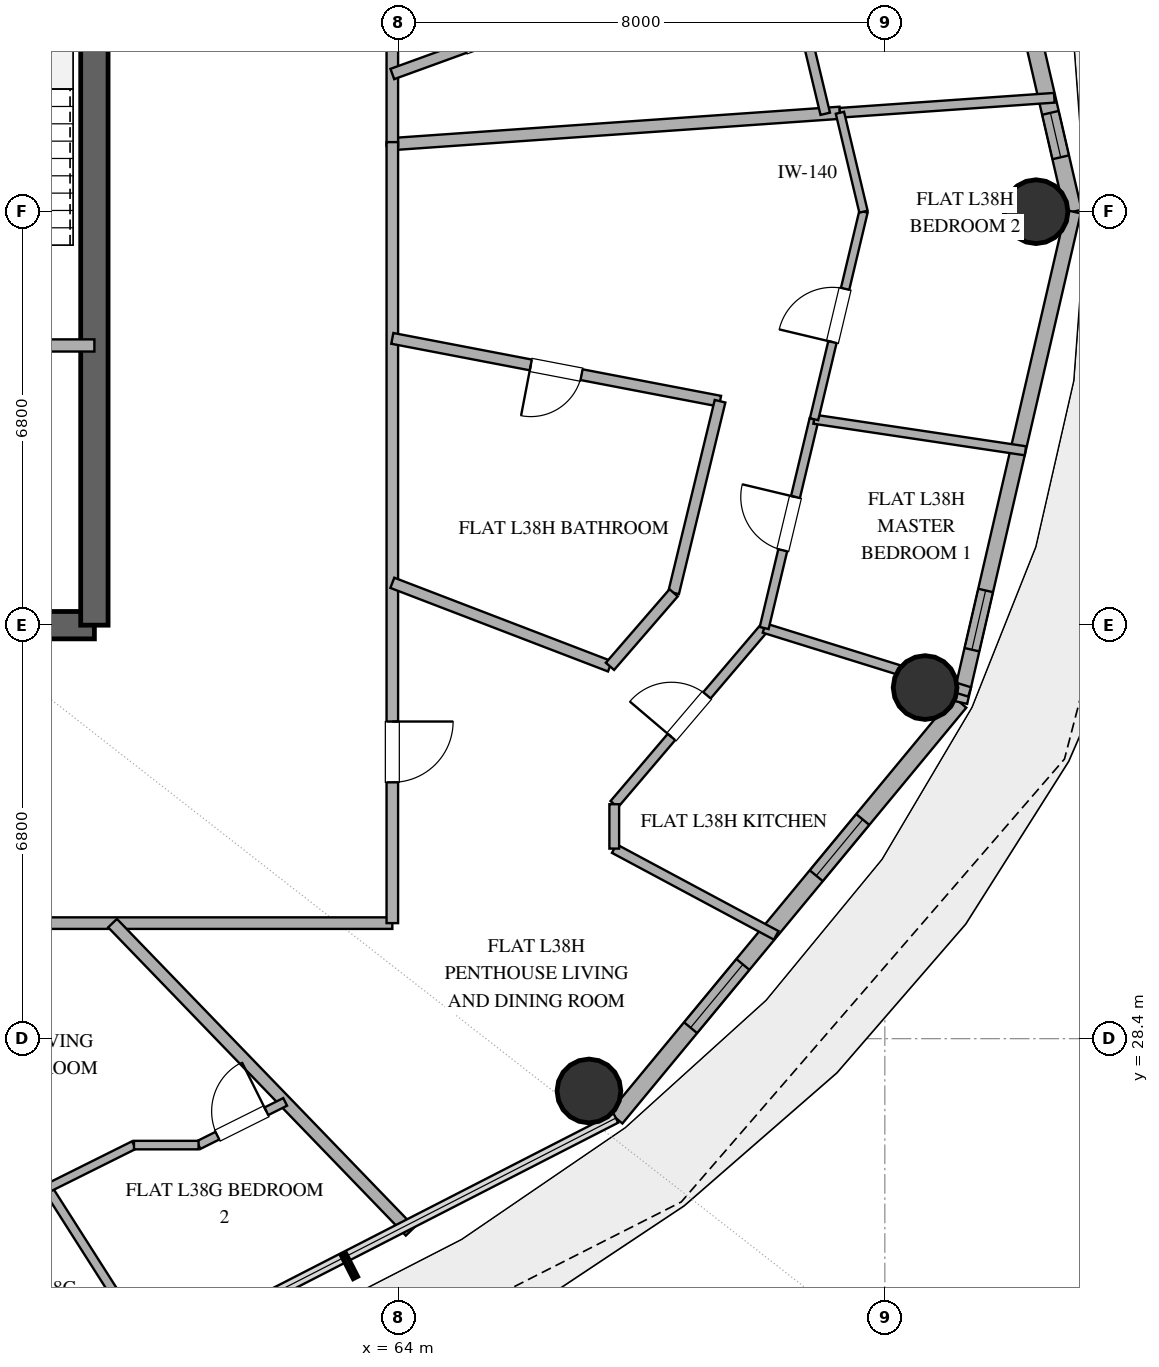
"""IFC4 building model, lengths in metres.
Left out: names, types, materials, properties, quantities, classifications, styles, units other than length and angle.
Written with IfcOpenShell. Run it as: python <this file> out.ifc"""

import sys

from ifc_helpers import new_model, si_unit, direction, frame, frame_2d, origin, origin_2d, place, context, subcontext, project, spatial, rectangle, hollow_circle, extrude, element, fill, save


model = new_model("IFC4")
c1 = context("Model", 3, precision=1e-05, world=origin(), true_north=direction((0.0, 1.0)))
c2 = subcontext(c1, "Body", "Model", "MODEL_VIEW")
j1 = project(units=[si_unit("LENGTHUNIT", "METRE"), si_unit("PLANEANGLEUNIT", "RADIAN")], contexts=[c1])
p1 = place(None, origin())
s1 = spatial("IfcSite", under=j1, at=p1, CompositionType="ELEMENT")
p2 = place(p1, origin())
s2 = spatial("IfcBuilding", under=s1, at=p2, CompositionType="ELEMENT")
p3 = place(p2, frame((0.0, 0.0, 154.2)))
s3 = spatial("IfcBuildingStorey", under=s2, at=p3, CompositionType="ELEMENT", Elevation=154.2)
p4 = place(p3, frame((55.0, 35.2, 0.0), z_axis=(0.0, 0.0, 1.0), x_axis=(1.0, 0.0, 0.0)))
e1 = element("IfcWall", 1, at=p4, inside=s3, PredefinedType="SHEAR", context=c2, shape_type="SweptSolid", body=[
    extrude(rectangle(XDim=4.0, YDim=0.45, at=frame_2d((2.0, 0.0))), origin(), (0.0, 0.0, 1.0), 3.38),
])
p5 = place(p4, frame((1.4, 0.0, 0.0)))
e2 = element("IfcOpeningElement", 2, at=p5, cuts=e1, PredefinedType="OPENING", context=c2, shape_type="SweptSolid", body=[
    extrude(rectangle(XDim=1.2, YDim=2.15, at=frame_2d((0.6, 1.075))), frame((0.0, 0.235, 0.0), z_axis=(0.0, -1.0, 0.0), x_axis=(1.0, 0.0, 0.0)), (0.0, 0.0, 1.0), 0.47),
])
p6 = place(p3, frame((59.0, 35.2, 0.0), z_axis=(0.0, 0.0, 1.0), x_axis=(0.0, 1.0, 0.0)))
e3 = element("IfcWall", 3, at=p6, inside=s3, PredefinedType="SHEAR", context=c2, shape_type="SweptSolid", body=[
    extrude(rectangle(XDim=13.6, YDim=0.45, at=frame_2d((6.8, 0.0))), origin(), (0.0, 0.0, 1.0), 3.38),
])
for number, where, z_axis, x_axis in (
    (4, (74.487, 42.0, 0.0), (0.0, 0.0, 1.0), (1.0, 0.0, 0.0)),
    (5, (67.134, 27.54, 0.0), (0.0, 0.0, 1.0), (1.0, 0.0, 0.0)),
    (6, (72.662, 34.174, 0.0), (0.0, 0.0, 1.0), (1.0, 0.0, 0.0)),
):
    element("IfcColumn", number, at=place(p3, frame(where, z_axis=z_axis, x_axis=x_axis)), inside=s3, PredefinedType="COLUMN", context=c2, shape_type="SweptSolid", body=[
        extrude(hollow_circle(Radius=0.525, WallThickness=0.028, at=origin_2d()), origin(), (0.0, 0.0, 1.0), 3.38),
    ])
p7 = place(p3, frame((75.099, 42.0, 0.0), z_axis=(0.0, 0.0, 1.0), x_axis=(-0.225473184558, 0.974249374157, 0.0)))
e7 = element("IfcWall", 7, at=p7, inside=s3, PredefinedType="SOLIDWALL", context=c2, shape_type="SweptSolid", body=[
    extrude(rectangle(XDim=8.28, YDim=0.28, at=frame_2d((4.14, 0.0))), origin(), (0.0, 0.0, 1.0), 3.38),
])
p8 = place(p7, frame((5.644, 0.0, 0.0)))
e8 = element("IfcOpeningElement", 8, at=p8, cuts=e7, PredefinedType="OPENING", context=c2, shape_type="SweptSolid", body=[
    extrude(rectangle(XDim=1.1, YDim=2.25, at=frame_2d((0.55, 1.125))), frame((0.0, 0.15, 0.0), z_axis=(0.0, -1.0, 0.0), x_axis=(1.0, 0.0, 0.0)), (0.0, 0.0, 1.0), 0.3),
])
p9 = place(p7, frame((0.918, 0.0, 0.85)))
e9 = element("IfcOpeningElement", 9, at=p9, cuts=e7, PredefinedType="OPENING", context=c2, shape_type="SweptSolid", body=[
    extrude(rectangle(XDim=0.75, YDim=1.8, at=frame_2d((0.375, 0.9))), frame((0.0, 0.15, 0.0), z_axis=(0.0, -1.0, 0.0), x_axis=(1.0, 0.0, 0.0)), (0.0, 0.0, 1.0), 0.3),
])
p10 = place(p3, frame((67.576, 27.094, 0.0), z_axis=(0.0, 0.0, 1.0), x_axis=(0.637333477683, 0.770588111915, 0.0)))
e10 = element("IfcWall", 10, at=p10, inside=s3, PredefinedType="SOLIDWALL", context=c2, shape_type="SweptSolid", body=[
    extrude(rectangle(XDim=8.875, YDim=0.28, at=frame_2d((4.438, 0.0))), origin(), (0.0, 0.0, 1.0), 3.38),
])
p11 = place(p10, frame((1.929, 0.0, 0.85)))
e11 = element("IfcOpeningElement", 11, at=p11, cuts=e10, PredefinedType="OPENING", context=c2, shape_type="SweptSolid", body=[
    extrude(rectangle(XDim=1.35, YDim=1.8, at=frame_2d((0.675, 0.9))), frame((0.0, 0.15, 0.0), z_axis=(0.0, -1.0, 0.0), x_axis=(1.0, 0.0, 0.0)), (0.0, 0.0, 1.0), 0.3),
])
p12 = place(p10, frame((5.172, 0.0, 0.85)))
e12 = element("IfcOpeningElement", 12, at=p12, cuts=e10, PredefinedType="OPENING", context=c2, shape_type="SweptSolid", body=[
    extrude(rectangle(XDim=1.2, YDim=1.8, at=frame_2d((0.6, 0.9))), frame((0.0, 0.15, 0.0), z_axis=(0.0, -1.0, 0.0), x_axis=(1.0, 0.0, 0.0)), (0.0, 0.0, 1.0), 0.3),
])
p13 = place(p3, frame((73.232, 33.933, 0.0), z_axis=(0.0, 0.0, 1.0), x_axis=(0.225473184558, 0.974249374157, 0.0)))
e13 = element("IfcWall", 13, at=p13, inside=s3, PredefinedType="SOLIDWALL", context=c2, shape_type="SweptSolid", body=[
    extrude(rectangle(XDim=8.28, YDim=0.25, at=frame_2d((4.14, 0.0))), origin(), (0.0, 0.0, 1.0), 3.38),
])
p14 = place(p13, frame((0.886, 0.0, 1.42)))
e14 = element("IfcOpeningElement", 14, at=p14, cuts=e13, PredefinedType="OPENING", context=c2, shape_type="SweptSolid", body=[
    extrude(rectangle(XDim=1.0, YDim=1.05, at=frame_2d((0.5, 0.525))), frame((0.0, 0.135, 0.0), z_axis=(0.0, -1.0, 0.0), x_axis=(1.0, 0.0, 0.0)), (0.0, 0.0, 1.0), 0.27),
])
p15 = place(p3, frame((55.0, 39.8, 0.0), z_axis=(0.0, 0.0, 1.0), x_axis=(1.0, 0.0, 0.0)))
e15 = element("IfcWall", 15, at=p15, inside=s3, PredefinedType="SOLIDWALL", context=c2, shape_type="SweptSolid", body=[
    extrude(rectangle(XDim=4.0, YDim=0.2, at=frame_2d((2.0, 0.0))), origin(), (0.0, 0.0, 1.0), 2.74),
])
p16 = place(p15, frame((1.45, 0.0, 0.0)))
e16 = element("IfcOpeningElement", 16, at=p16, cuts=e15, PredefinedType="OPENING", context=c2, shape_type="SweptSolid", body=[
    extrude(rectangle(XDim=1.1, YDim=2.15, at=frame_2d((0.55, 1.075))), frame((0.0, 0.11, 0.0), z_axis=(0.0, -1.0, 0.0), x_axis=(1.0, 0.0, 0.0)), (0.0, 0.0, 1.0), 0.22),
])
p17 = place(p3, frame((48.891, 30.3, 0.0), z_axis=(0.0, 0.0, 1.0), x_axis=(1.0, 0.0, 0.0)))
e17 = element("IfcWall", 17, at=p17, inside=s3, PredefinedType="PARTITIONING", context=c2, shape_type="SweptSolid", body=[
    extrude(rectangle(XDim=15.009, YDim=0.19, at=frame_2d((7.504, 0.0))), origin(), (0.0, 0.0, 1.0), 2.74),
])
p18 = place(p17, frame((4.704, 0.0, 0.0)))
e18 = element("IfcOpeningElement", 18, at=p18, cuts=e17, PredefinedType="OPENING", context=c2, shape_type="SweptSolid", body=[
    extrude(rectangle(XDim=1.0, YDim=2.2, at=frame_2d((0.5, 1.1))), frame((0.0, 0.105, 0.0), z_axis=(0.0, -1.0, 0.0), x_axis=(1.0, 0.0, 0.0)), (0.0, 0.0, 1.0), 0.21),
])
p19 = place(p3, frame((71.261, 43.627, 0.0), z_axis=(0.0, 0.0, 1.0), x_axis=(-0.997562906323, -0.069772830877, 0.0)))
e19 = element("IfcWall", 19, at=p19, inside=s3, PredefinedType="PARTITIONING", context=c2, shape_type="SweptSolid", body=[
    extrude(rectangle(XDim=7.38, YDim=0.2, at=frame_2d((3.69, 0.0))), origin(), (0.0, 0.0, 1.0), 2.74),
])
p20 = place(p3, frame((63.9, 53.7, 0.0), z_axis=(0.0, 0.0, 1.0), x_axis=(0.0, -1.0, 0.0)))
e20 = element("IfcWall", 20, at=p20, inside=s3, PredefinedType="PARTITIONING", context=c2, shape_type="SweptSolid", body=[
    extrude(rectangle(XDim=10.62, YDim=0.19, at=frame_2d((5.31, 0.0))), origin(), (0.0, 0.0, 1.0), 2.74),
])
p21 = place(p20, frame((2.48, 0.0, 0.0)))
e21 = element("IfcOpeningElement", 21, at=p21, cuts=e20, PredefinedType="OPENING", context=c2, shape_type="SweptSolid", body=[
    extrude(rectangle(XDim=1.0, YDim=2.2, at=frame_2d((0.5, 1.1))), frame((0.0, 0.105, 0.0), z_axis=(0.0, -1.0, 0.0), x_axis=(1.0, 0.0, 0.0)), (0.0, 0.0, 1.0), 0.21),
])
p22 = place(p3, frame((63.9, 43.144, 0.0), z_axis=(0.0, 0.0, 1.0), x_axis=(0.0, -1.0, 0.0)))
e22 = element("IfcWall", 22, at=p22, inside=s3, PredefinedType="PARTITIONING", context=c2, shape_type="SweptSolid", body=[
    extrude(rectangle(XDim=12.844, YDim=0.19, at=frame_2d((6.422, 0.0))), origin(), (0.0, 0.0, 1.0), 2.74),
])
p23 = place(p22, frame((9.529, 0.0, 0.0)))
e23 = element("IfcOpeningElement", 23, at=p23, cuts=e22, PredefinedType="OPENING", context=c2, shape_type="SweptSolid", body=[
    extrude(rectangle(XDim=1.0, YDim=2.2, at=frame_2d((0.5, 1.1))), frame((0.0, 0.105, 0.0), z_axis=(0.0, -1.0, 0.0), x_axis=(1.0, 0.0, 0.0)), (0.0, 0.0, 1.0), 0.21),
])
p24 = place(p3, frame((69.29, 38.883, 0.0), z_axis=(0.0, 0.0, 1.0), x_axis=(-0.98210182834, 0.188350733396, 0.0)))
e24 = element("IfcWall", 24, at=p24, inside=s3, PredefinedType="PLUMBINGWALL", context=c2, shape_type="SweptSolid", body=[
    extrude(rectangle(XDim=5.488, YDim=0.18, at=frame_2d((2.744, 0.0))), origin(), (0.0, 0.0, 1.0), 2.74),
])
p25 = place(p24, frame((2.319, 0.0, 0.0)))
e25 = element("IfcOpeningElement", 25, at=p25, cuts=e24, PredefinedType="OPENING", context=c2, shape_type="SweptSolid", body=[
    extrude(rectangle(XDim=0.85, YDim=2.1, at=frame_2d((0.425, 1.05))), frame((0.0, 0.1, 0.0), z_axis=(0.0, -1.0, 0.0), x_axis=(1.0, 0.0, 0.0)), (0.0, 0.0, 1.0), 0.2),
])
p26 = place(p3, frame((69.793, 48.728, 0.0), z_axis=(0.0, 0.0, 1.0), x_axis=(0.23310450522, -0.972451690135, 0.0)))
e26 = element("IfcWall", 26, at=p26, inside=s3, PredefinedType="PLUMBINGWALL", context=c2, shape_type="SweptSolid", body=[
    extrude(rectangle(XDim=5.263, YDim=0.16, at=frame_2d((2.631, 0.0))), origin(), (0.0, 0.0, 1.0), 2.74),
])
p27 = place(p26, frame((2.181, 0.0, 0.0)))
e27 = element("IfcOpeningElement", 27, at=p27, cuts=e26, PredefinedType="OPENING", context=c2, shape_type="SweptSolid", body=[
    extrude(rectangle(XDim=0.9, YDim=2.1, at=frame_2d((0.45, 1.05))), frame((0.0, 0.09, 0.0), z_axis=(0.0, -1.0, 0.0), x_axis=(1.0, 0.0, 0.0)), (0.0, 0.0, 1.0), 0.18),
])
p28 = place(p3, frame((59.299, 30.3, 0.0), z_axis=(0.0, 0.0, 1.0), x_axis=(0.694647685064, -0.719350118952, 0.0)))
e28 = element("IfcWall", 28, at=p28, inside=s3, PredefinedType="PARTITIONING", context=c2, shape_type="SweptSolid", body=[
    extrude(rectangle(XDim=7.047, YDim=0.2, at=frame_2d((3.523, 0.0))), origin(), (0.0, 0.0, 1.0), 2.74),
])
p29 = place(p3, frame((63.9, 35.896, 0.0), z_axis=(0.0, 0.0, 1.0), x_axis=(0.933598121494, -0.3583218491, 0.0)))
e29 = element("IfcWall", 29, at=p29, inside=s3, PredefinedType="PLUMBINGWALL", context=c2, shape_type="SweptSolid", body=[
    extrude(rectangle(XDim=3.834, YDim=0.18, at=frame_2d((1.917, 0.0))), origin(), (0.0, 0.0, 1.0), 2.74),
])
p30 = place(p3, frame((67.55, 32.256, 0.0), z_axis=(0.0, 0.0, 1.0), x_axis=(0.648060027494, 0.76158925988, 0.0)))
e30 = element("IfcWall", 30, at=p30, inside=s3, PredefinedType="PLUMBINGWALL", context=c2, shape_type="SweptSolid", body=[
    extrude(rectangle(XDim=3.804, YDim=0.16, at=frame_2d((1.902, 0.0))), origin(), (0.0, 0.0, 1.0), 2.74),
])
p31 = place(p30, frame((1.452, 0.0, 0.0)))
e31 = element("IfcOpeningElement", 31, at=p31, cuts=e30, PredefinedType="OPENING", context=c2, shape_type="SweptSolid", body=[
    extrude(rectangle(XDim=0.9, YDim=2.1, at=frame_2d((0.45, 1.05))), frame((0.0, 0.09, 0.0), z_axis=(0.0, -1.0, 0.0), x_axis=(1.0, 0.0, 0.0)), (0.0, 0.0, 1.0), 0.18),
])
p32 = place(p3, frame((70.015, 35.153, 0.0), z_axis=(0.0, 0.0, 1.0), x_axis=(0.954891562425, -0.296954717101, 0.0)))
e32 = element("IfcWall", 32, at=p32, inside=s3, PredefinedType="PLUMBINGWALL", context=c2, shape_type="SweptSolid", body=[
    extrude(rectangle(XDim=3.539, YDim=0.16, at=frame_2d((1.769, 0.0))), origin(), (0.0, 0.0, 1.0), 2.74),
])
p33 = place(p3, frame((71.261, 43.627, 0.0), z_axis=(0.0, 0.0, 1.0), x_axis=(0.997563824095, 0.069759707979, 0.0)))
e33 = element("IfcWall", 33, at=p33, inside=s3, PredefinedType="PLUMBINGWALL", context=c2, shape_type="SweptSolid", body=[
    extrude(rectangle(XDim=3.535, YDim=0.16, at=frame_2d((1.767, 0.0))), origin(), (0.0, 0.0, 1.0), 2.74),
])
p34 = place(p3, frame((70.015, 35.153, 0.0), z_axis=(0.0, 0.0, 1.0), x_axis=(0.232452361323, 0.972607783084, 0.0)))
e34 = element("IfcWall", 34, at=p34, inside=s3, PredefinedType="PARTITIONING", context=c2, shape_type="SweptSolid", body=[
    extrude(rectangle(XDim=3.531, YDim=0.15, at=frame_2d((1.766, 0.0))), origin(), (0.0, 0.0, 1.0), 2.74),
])
p35 = place(p34, frame((1.315, 0.0, 0.0)))
e35 = element("IfcOpeningElement", 35, at=p35, cuts=e34, PredefinedType="OPENING", context=c2, shape_type="SweptSolid", body=[
    extrude(rectangle(XDim=0.9, YDim=2.1, at=frame_2d((0.45, 1.05))), frame((0.0, 0.085, 0.0), z_axis=(0.0, -1.0, 0.0), x_axis=(1.0, 0.0, 0.0)), (0.0, 0.0, 1.0), 0.17),
])
p36 = place(p3, frame((74.312, 38.068, 0.0), z_axis=(0.0, 0.0, 1.0), x_axis=(-0.989013160958, 0.147827492205, 0.0)))
e36 = element("IfcWall", 36, at=p36, inside=s3, PredefinedType="PARTITIONING", context=c2, shape_type="SweptSolid", body=[
    extrude(rectangle(XDim=3.514, YDim=0.15, at=frame_2d((1.757, 0.0))), origin(), (0.0, 0.0, 1.0), 2.74),
])
p37 = place(p3, frame((70.836, 38.587, 0.0), z_axis=(0.0, 0.0, 1.0), x_axis=(0.231598574747, 0.972811441223, 0.0)))
e37 = element("IfcWall", 37, at=p37, inside=s3, PredefinedType="PARTITIONING", context=c2, shape_type="SweptSolid", body=[
    extrude(rectangle(XDim=3.508, YDim=0.14, at=frame_2d((1.754, 0.0))), origin(), (0.0, 0.0, 1.0), 2.74),
])
p38 = place(p37, frame((1.304, 0.0, 0.0)))
e38 = element("IfcOpeningElement", 38, at=p38, cuts=e37, PredefinedType="OPENING", context=c2, shape_type="SweptSolid", body=[
    extrude(rectangle(XDim=0.9, YDim=2.1, at=frame_2d((0.45, 1.05))), frame((0.0, 0.08, 0.0), z_axis=(0.0, -1.0, 0.0), x_axis=(1.0, 0.0, 0.0)), (0.0, 0.0, 1.0), 0.16),
])
p39 = place(p3, frame((63.9, 44.264, 0.0), z_axis=(0.0, 0.0, 1.0), x_axis=(0.939936319397, 0.341349843238, 0.0)))
e39 = element("IfcWall", 39, at=p39, inside=s3, PredefinedType="PLUMBINGWALL", context=c2, shape_type="SweptSolid", body=[
    extrude(rectangle(XDim=3.39, YDim=0.18, at=frame_2d((1.695, 0.0))), origin(), (0.0, 0.0, 1.0), 2.74),
])
p40 = place(p39, frame((1.27, 0.0, 0.0)))
e40 = element("IfcOpeningElement", 40, at=p40, cuts=e39, PredefinedType="OPENING", context=c2, shape_type="SweptSolid", body=[
    extrude(rectangle(XDim=0.85, YDim=2.1, at=frame_2d((0.425, 1.05))), frame((0.0, 0.1, 0.0), z_axis=(0.0, -1.0, 0.0), x_axis=(1.0, 0.0, 0.0)), (0.0, 0.0, 1.0), 0.2),
])
p41 = place(p3, frame((60.042, 23.097, 0.0), z_axis=(0.0, 0.0, 1.0), x_axis=(-0.537325063909, 0.843375228291, 0.0)))
e41 = element("IfcWall", 41, at=p41, inside=s3, PredefinedType="PARTITIONING", context=c2, shape_type="SweptSolid", body=[
    extrude(rectangle(XDim=3.373, YDim=0.15, at=frame_2d((1.687, 0.0))), origin(), (0.0, 0.0, 1.0), 2.74),
])
p42 = place(p3, frame((68.526, 35.732, 0.0), z_axis=(0.0, 0.0, 1.0), x_axis=(0.235531062042, 0.971866821541, 0.0)))
e42 = element("IfcWall", 42, at=p42, inside=s3, PredefinedType="PLUMBINGWALL", context=c2, shape_type="SweptSolid", body=[
    extrude(rectangle(XDim=3.242, YDim=0.18, at=frame_2d((1.621, 0.0))), origin(), (0.0, 0.0, 1.0), 2.74),
])
p43 = place(p3, frame((70.214, 30.099, 0.0), z_axis=(0.0, 0.0, 1.0), x_axis=(-0.881434325569, 0.472306605616, 0.0)))
e43 = element("IfcWall", 43, at=p43, inside=s3, PredefinedType="PLUMBINGWALL", context=c2, shape_type="SweptSolid", body=[
    extrude(rectangle(XDim=3.022, YDim=0.16, at=frame_2d((1.511, 0.0))), origin(), (0.0, 0.0, 1.0), 2.74),
])
p44 = place(p3, frame((71.649, 42.0, 0.0), z_axis=(0.0, 0.0, 1.0), x_axis=(-0.231561310927, 0.972820311919, 0.0)))
e44 = element("IfcWall", 44, at=p44, inside=s3, PredefinedType="PARTITIONING", context=c2, shape_type="SweptSolid", body=[
    extrude(rectangle(XDim=1.672, YDim=0.14, at=frame_2d((0.836, 0.0))), origin(), (0.0, 0.0, 1.0), 2.74),
])
p45 = place(p3, frame((67.479, 34.523, 0.0), z_axis=(0.0, 0.0, 1.0), x_axis=(0.654605010187, 0.755971084525, 0.0)))
e45 = element("IfcWall", 45, at=p45, inside=s3, PredefinedType="PLUMBINGWALL", context=c2, shape_type="SweptSolid", body=[
    extrude(rectangle(XDim=1.599, YDim=0.18, at=frame_2d((0.8, 0.0))), origin(), (0.0, 0.0, 1.0), 2.74),
])
p46 = place(p3, frame((60.713, 26.65, 0.0), z_axis=(0.0, 0.0, 1.0), x_axis=(0.894917522296, 0.446231585937, 0.0)))
e46 = element("IfcWall", 46, at=p46, inside=s3, PredefinedType="PARTITIONING", context=c2, shape_type="SweptSolid", body=[
    extrude(rectangle(XDim=1.592, YDim=0.14, at=frame_2d((0.796, 0.0))), origin(), (0.0, 0.0, 1.0), 2.74),
])
p47 = place(p46, frame((0.346, 0.0, 0.0)))
e47 = element("IfcOpeningElement", 47, at=p47, cuts=e46, PredefinedType="OPENING", context=c2, shape_type="SweptSolid", body=[
    extrude(rectangle(XDim=0.9, YDim=2.1, at=frame_2d((0.45, 1.05))), frame((0.0, 0.08, 0.0), z_axis=(0.0, -1.0, 0.0), x_axis=(1.0, 0.0, 0.0)), (0.0, 0.0, 1.0), 0.16),
])
p48 = place(p3, frame((58.23, 25.942, 0.0), z_axis=(0.0, 0.0, 1.0), x_axis=(0.895072075717, 0.445921494516, 0.0)))
e48 = element("IfcWall", 48, at=p48, inside=s3, PredefinedType="PARTITIONING", context=c2, shape_type="SweptSolid", body=[
    extrude(rectangle(XDim=1.588, YDim=0.14, at=frame_2d((0.794, 0.0))), origin(), (0.0, 0.0, 1.0), 2.74),
])
p49 = place(p3, frame((59.651, 26.65, 0.0), z_axis=(0.0, 0.0, 1.0), x_axis=(1.0, 0.0, 0.0)))
e49 = element("IfcWall", 49, at=p49, inside=s3, PredefinedType="PARTITIONING", context=c2, shape_type="SweptSolid", body=[
    extrude(rectangle(XDim=1.062, YDim=0.14, at=frame_2d((0.531, 0.0))), origin(), (0.0, 0.0, 1.0), 2.74),
])
p50 = place(p3, frame((67.55, 31.526, 0.0), z_axis=(0.0, 0.0, 1.0), x_axis=(0.0, 1.0, 0.0)))
e50 = element("IfcWall", 50, at=p50, inside=s3, PredefinedType="PLUMBINGWALL", context=c2, shape_type="SweptSolid", body=[
    extrude(rectangle(XDim=0.73, YDim=0.16, at=frame_2d((0.365, 0.0))), origin(), (0.0, 0.0, 1.0), 2.74),
])
p51 = place(p11, origin())
e51 = element("IfcWindow", 51, at=p51, inside=s3, PartitioningType="SINGLE_PANEL", PredefinedType="WINDOW", context=c2, shape_type="SweptSolid", body=[
    extrude(rectangle(XDim=1.35, YDim=1.8, at=frame_2d((0.675, 0.9))), frame((0.0, 0.03, 0.0), z_axis=(0.0, -1.0, 0.0), x_axis=(1.0, 0.0, 0.0)), (0.0, 0.0, 1.0), 0.06),
])
fill(e11, e51)
p52 = place(p12, origin())
e52 = element("IfcWindow", 52, at=p52, inside=s3, PartitioningType="SINGLE_PANEL", PredefinedType="WINDOW", context=c2, shape_type="SweptSolid", body=[
    extrude(rectangle(XDim=1.2, YDim=1.8, at=frame_2d((0.6, 0.9))), frame((0.0, 0.03, 0.0), z_axis=(0.0, -1.0, 0.0), x_axis=(1.0, 0.0, 0.0)), (0.0, 0.0, 1.0), 0.06),
])
fill(e12, e52)
p53 = place(p14, origin())
e53 = element("IfcWindow", 53, at=p53, inside=s3, PartitioningType="SINGLE_PANEL", PredefinedType="WINDOW", context=c2, shape_type="SweptSolid", body=[
    extrude(rectangle(XDim=1.0, YDim=1.05, at=frame_2d((0.5, 0.525))), frame((0.0, 0.03, 0.0), z_axis=(0.0, -1.0, 0.0), x_axis=(1.0, 0.0, 0.0)), (0.0, 0.0, 1.0), 0.06),
])
fill(e14, e53)
p54 = place(p9, origin())
e54 = element("IfcWindow", 54, at=p54, inside=s3, PartitioningType="SINGLE_PANEL", PredefinedType="WINDOW", context=c2, shape_type="SweptSolid", body=[
    extrude(rectangle(XDim=0.75, YDim=1.8, at=frame_2d((0.375, 0.9))), frame((0.0, 0.03, 0.0), z_axis=(0.0, -1.0, 0.0), x_axis=(1.0, 0.0, 0.0)), (0.0, 0.0, 1.0), 0.06),
])
fill(e9, e54)
p55 = place(p23, origin())
e55 = element("IfcDoor", 55, at=p55, inside=s3, OperationType="SINGLE_SWING_LEFT", PredefinedType="DOOR", context=c2, shape_type="SweptSolid", body=[
    extrude(rectangle(XDim=1.0, YDim=2.2, at=frame_2d((0.5, 1.1))), frame((0.0, 0.025, 0.0), z_axis=(0.0, -1.0, 0.0), x_axis=(1.0, 0.0, 0.0)), (0.0, 0.0, 1.0), 0.05),
])
fill(e23, e55)
p56 = place(p25, origin())
e56 = element("IfcDoor", 56, at=p56, inside=s3, OperationType="SINGLE_SWING_RIGHT", PredefinedType="DOOR", context=c2, shape_type="SweptSolid", body=[
    extrude(rectangle(XDim=0.85, YDim=2.1, at=frame_2d((0.425, 1.05))), frame((0.0, 0.025, 0.0), z_axis=(0.0, -1.0, 0.0), x_axis=(1.0, 0.0, 0.0)), (0.0, 0.0, 1.0), 0.05),
])
fill(e25, e56)
p57 = place(p31, origin())
e57 = element("IfcDoor", 57, at=p57, inside=s3, OperationType="SINGLE_SWING_LEFT", PredefinedType="DOOR", context=c2, shape_type="SweptSolid", body=[
    extrude(rectangle(XDim=0.9, YDim=2.1, at=frame_2d((0.45, 1.05))), frame((0.0, 0.025, 0.0), z_axis=(0.0, -1.0, 0.0), x_axis=(1.0, 0.0, 0.0)), (0.0, 0.0, 1.0), 0.05),
])
fill(e31, e57)
p58 = place(p35, origin())
e58 = element("IfcDoor", 58, at=p58, inside=s3, OperationType="SINGLE_SWING_RIGHT", PredefinedType="DOOR", context=c2, shape_type="SweptSolid", body=[
    extrude(rectangle(XDim=0.9, YDim=2.1, at=frame_2d((0.45, 1.05))), frame((0.0, 0.025, 0.0), z_axis=(0.0, -1.0, 0.0), x_axis=(1.0, 0.0, 0.0)), (0.0, 0.0, 1.0), 0.05),
])
fill(e35, e58)
p59 = place(p38, origin())
e59 = element("IfcDoor", 59, at=p59, inside=s3, OperationType="SINGLE_SWING_LEFT", PredefinedType="DOOR", context=c2, shape_type="SweptSolid", body=[
    extrude(rectangle(XDim=0.9, YDim=2.1, at=frame_2d((0.45, 1.05))), frame((0.0, 0.025, 0.0), z_axis=(0.0, -1.0, 0.0), x_axis=(1.0, 0.0, 0.0)), (0.0, 0.0, 1.0), 0.05),
])
fill(e38, e59)
p60 = place(p47, origin())
e60 = element("IfcDoor", 60, at=p60, inside=s3, OperationType="SINGLE_SWING_RIGHT", PredefinedType="DOOR", context=c2, shape_type="SweptSolid", body=[
    extrude(rectangle(XDim=0.9, YDim=2.1, at=frame_2d((0.45, 1.05))), frame((0.0, 0.025, 0.0), z_axis=(0.0, -1.0, 0.0), x_axis=(1.0, 0.0, 0.0)), (0.0, 0.0, 1.0), 0.05),
])
fill(e47, e60)
save(model, sys.argv[1])
